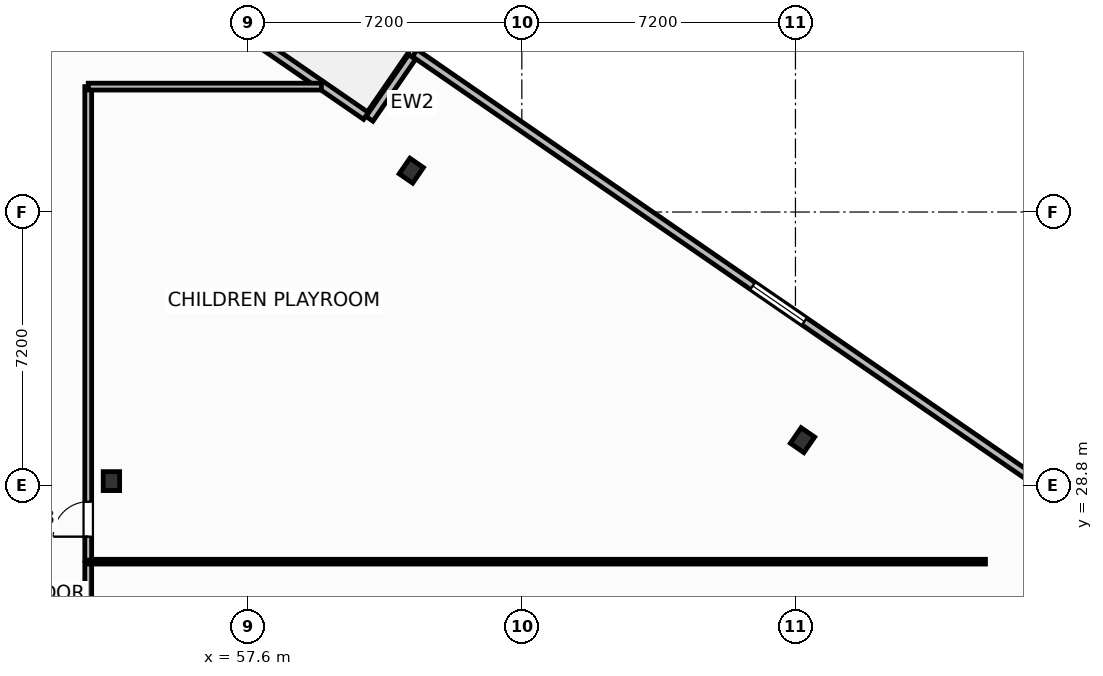
"""IFC4 building model, lengths in metres.
Left out: names, types, materials, properties, quantities, classifications, styles, units other than length and angle.
Written with IfcOpenShell. Run it as: python <this file> out.ifc"""

import sys

from ifc_helpers import new_model, si_unit, direction, frame, frame_2d, origin, origin_2d, place, context, subcontext, project, spatial, rectangle, i_section, extrude, element, fill, save


model = new_model("IFC4")
c1 = context("Model", 3, precision=1e-05, world=origin(), true_north=direction((0.0, 1.0)))
c2 = subcontext(c1, "Body", "Model", "MODEL_VIEW")
j1 = project(units=[si_unit("LENGTHUNIT", "METRE"), si_unit("PLANEANGLEUNIT", "RADIAN")], contexts=[c1])
p1 = place(None, origin())
s1 = spatial("IfcSite", under=j1, at=p1, CompositionType="ELEMENT")
p2 = place(p1, origin())
s2 = spatial("IfcBuilding", under=s1, at=p2, CompositionType="ELEMENT")
p3 = place(p2, frame((0.0, 0.0, 60.3)))
s3 = spatial("IfcBuildingStorey", under=s2, at=p3, CompositionType="ELEMENT", Elevation=60.3)
for number, where, z_axis, x_axis in (
    (1, (54.0, 28.92, 0.0), (0.0, 0.0, 1.0), (1.0, 0.0, 0.0)),
    (2, (72.186, 29.997, 0.0), (0.0, 0.0, 1.0), (0.824, -0.567, 0.0)),
    (3, (61.891, 37.088, 0.0), (0.0, 0.0, 1.0), (0.824, -0.567, 0.0)),
):
    element("IfcColumn", number, at=place(p3, frame(where, z_axis=z_axis, x_axis=x_axis)), inside=s3, PredefinedType="COLUMN", context=c2, shape_type="SweptSolid", body=[
        extrude(i_section(OverallWidth=0.432, OverallDepth=0.498, WebThickness=0.056, FlangeThickness=0.089, FilletRadius=0.025, at=origin_2d()), origin(), (0.0, 0.0, 1.0), 3.7),
    ])
p4 = place(p3, frame((55.757, 41.933, 0.0), z_axis=(0.0, 0.0, 1.0), x_axis=(0.823534636215, -0.567265989598, 0.0)))
e4 = element("IfcWall", 4, at=p4, inside=s3, PredefinedType="SOLIDWALL", context=c2, shape_type="SweptSolid", body=[
    extrude(rectangle(XDim=6.0, YDim=0.22, at=frame_2d((3.0, 0.0))), origin(), (0.0, 0.0, 1.0), 2.73),
])
p5 = place(p4, frame((0.696, 0.0, 0.0)))
e5 = element("IfcOpeningElement", 5, at=p5, cuts=e4, PredefinedType="OPENING", context=c2, shape_type="SweptSolid", body=[
    extrude(rectangle(XDim=1.5, YDim=2.25, at=frame_2d((0.75, 1.125))), frame((0.0, 0.12, 0.0), z_axis=(0.0, -1.0, 0.0), x_axis=(1.0, 0.0, 0.0)), (0.0, 0.0, 1.0), 0.24),
])
p6 = place(p3, frame((81.127, 26.995, 0.0), z_axis=(0.0, 0.0, 1.0), x_axis=(-0.823530169317, 0.567272474411, 0.0)))
e6 = element("IfcWall", 6, at=p6, inside=s3, PredefinedType="SOLIDWALL", context=c2, shape_type="SweptSolid", body=[
    extrude(rectangle(XDim=23.247, YDim=0.22, at=frame_2d((11.624, 0.0))), origin(), (0.0, 0.0, 1.0), 2.73),
])
p7 = place(p6, frame((10.799, 0.0, 0.8)))
e7 = element("IfcOpeningElement", 7, at=p7, cuts=e6, PredefinedType="OPENING", context=c2, shape_type="SweptSolid", body=[
    extrude(rectangle(XDim=1.65, YDim=1.65, at=frame_2d((0.825, 0.825))), frame((0.0, 0.12, 0.0), z_axis=(0.0, -1.0, 0.0), x_axis=(1.0, 0.0, 0.0)), (0.0, 0.0, 1.0), 0.24),
])
p8 = place(p3, frame((61.912, 40.079, 0.0), z_axis=(0.0, 0.0, 1.0), x_axis=(-0.567189720735, -0.82358716642, 0.0)))
e8 = element("IfcWall", 8, at=p8, inside=s3, PredefinedType="SOLIDWALL", context=c2, shape_type="SweptSolid", body=[
    extrude(rectangle(XDim=1.975, YDim=0.22, at=frame_2d((0.987, 0.0))), origin(), (0.0, 0.0, 1.0), 2.73),
])
p9 = place(p3, frame((53.39, 19.24, 0.0), z_axis=(0.0, 0.0, 1.0), x_axis=(0.0, 1.0, 0.0)))
e9 = element("IfcWall", 9, at=p9, inside=s3, PredefinedType="PARTITIONING", context=c2, shape_type="SweptSolid", body=[
    extrude(rectangle(XDim=7.52, YDim=0.18, at=frame_2d((3.76, 0.0))), origin(), (0.0, 0.0, 1.0), 3.45),
])
p10 = place(p9, frame((2.1, 0.0, 0.0)))
e10 = element("IfcOpeningElement", 10, at=p10, cuts=e9, PredefinedType="OPENING", context=c2, shape_type="SweptSolid", body=[
    extrude(rectangle(XDim=0.92, YDim=2.05, at=frame_2d((0.46, 1.025))), frame((0.0, 0.1, 0.0), z_axis=(0.0, -1.0, 0.0), x_axis=(1.0, 0.0, 0.0)), (0.0, 0.0, 1.0), 0.2),
])
p11 = place(p3, frame((53.39, 26.8, 0.0), z_axis=(0.0, 0.0, 1.0), x_axis=(1.0, 0.0, 0.0)))
e11 = element("IfcWall", 11, at=p11, inside=s3, PredefinedType="PARTITIONING", context=c2, shape_type="SweptSolid", body=[
    extrude(rectangle(XDim=23.61, YDim=0.125, at=frame_2d((11.805, 0.0))), origin(), (0.0, 0.0, 1.0), 3.45),
])
p12 = place(p3, frame((53.39, 26.84, 0.0), z_axis=(0.0, 0.0, 1.0), x_axis=(0.0, 1.0, 0.0)))
e12 = element("IfcWall", 12, at=p12, inside=s3, PredefinedType="PARTITIONING", context=c2, shape_type="SweptSolid", body=[
    extrude(rectangle(XDim=12.46, YDim=0.18, at=frame_2d((6.23, 0.0))), origin(), (0.0, 0.0, 1.0), 3.45),
])
p13 = place(p12, frame((0.618, 0.0, 0.0)))
e13 = element("IfcOpeningElement", 13, at=p13, cuts=e12, PredefinedType="OPENING", context=c2, shape_type="SweptSolid", body=[
    extrude(rectangle(XDim=0.92, YDim=2.05, at=frame_2d((0.46, 1.025))), frame((0.0, 0.1, 0.0), z_axis=(0.0, -1.0, 0.0), x_axis=(1.0, 0.0, 0.0)), (0.0, 0.0, 1.0), 0.2),
])
p14 = place(p3, frame((53.39, 39.3, 0.0), z_axis=(0.0, 0.0, 1.0), x_axis=(1.0, 0.0, 0.0)))
e14 = element("IfcWall", 14, at=p14, inside=s3, PredefinedType="PARTITIONING", context=c2, shape_type="SweptSolid", body=[
    extrude(rectangle(XDim=6.136, YDim=0.18, at=frame_2d((3.068, 0.0))), origin(), (0.0, 0.0, 1.0), 3.45),
])
p15 = place(p7, origin())
e15 = element("IfcWindow", 15, at=p15, inside=s3, PartitioningType="SINGLE_PANEL", PredefinedType="WINDOW", context=c2, shape_type="SweptSolid", body=[
    extrude(rectangle(XDim=1.65, YDim=1.65, at=frame_2d((0.825, 0.825))), frame((0.0, 0.03, 0.0), z_axis=(0.0, -1.0, 0.0), x_axis=(1.0, 0.0, 0.0)), (0.0, 0.0, 1.0), 0.06),
])
fill(e7, e15)
p16 = place(p13, origin())
e16 = element("IfcDoor", 16, at=p16, inside=s3, OperationType="SINGLE_SWING_LEFT", PredefinedType="DOOR", context=c2, shape_type="SweptSolid", body=[
    extrude(rectangle(XDim=0.92, YDim=2.05, at=frame_2d((0.46, 1.025))), frame((0.0, 0.025, 0.0), z_axis=(0.0, -1.0, 0.0), x_axis=(1.0, 0.0, 0.0)), (0.0, 0.0, 1.0), 0.05),
])
fill(e13, e16)
save(model, sys.argv[1])
